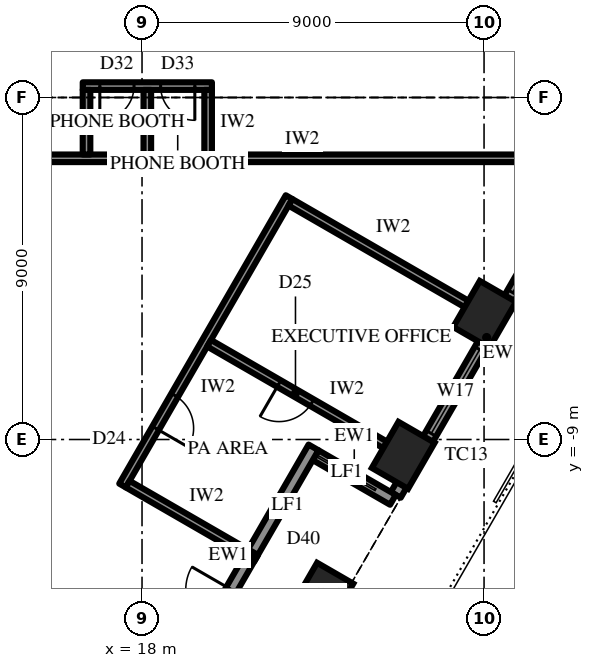
"""IFC4 building model, lengths in metres.
Left out: names, types, materials, properties, quantities, classifications, styles, units other than length and angle.
Written with IfcOpenShell. Run it as: python <this file> out.ifc"""

import sys

from ifc_helpers import new_model, si_unit, direction, frame, frame_2d, origin, origin_2d, place, context, subcontext, project, spatial, rectangle, extrude, element, fill, save


model = new_model("IFC4")
c1 = context("Model", 3, precision=1e-05, world=origin(), true_north=direction((0.0, 1.0)))
c2 = subcontext(c1, "Body", "Model", "MODEL_VIEW")
j1 = project(units=[si_unit("LENGTHUNIT", "METRE"), si_unit("PLANEANGLEUNIT", "RADIAN")], contexts=[c1])
p1 = place(None, origin())
s1 = spatial("IfcSite", under=j1, at=p1, CompositionType="ELEMENT")
p2 = place(p1, origin())
s2 = spatial("IfcBuilding", under=s1, at=p2, CompositionType="ELEMENT")
p3 = place(p2, frame((0.0, 0.0, 328.3)))
s3 = spatial("IfcBuildingStorey", under=s2, at=p3, CompositionType="ELEMENT", Elevation=328.3)
for number, where, z_axis, x_axis in (
    (1, (22.733, -13.125, 0.0), (0.0, 0.0, 1.0), (0.5, 0.866, 0.0)),
    (2, (24.874, -9.417, 0.0), (0.0, 0.0, 1.0), (0.5, 0.866, 0.0)),
    (3, (27.015, -5.708, 0.0), (0.0, 0.0, 1.0), (0.5, 0.866, 0.0)),
):
    element("IfcColumn", number, at=place(p3, frame(where, z_axis=z_axis, x_axis=x_axis)), inside=s3, PredefinedType="COLUMN", context=c2, shape_type="SweptSolid", body=[
        extrude(rectangle(XDim=1.4, YDim=1.1, at=origin_2d()), origin(), (0.0, 0.0, 1.0), 4.2),
    ])
p4 = place(p3, frame((24.677, -10.458, 0.0), z_axis=(0.0, 0.0, 1.0), x_axis=(0.499996453679, 0.866027451244, 0.0)))
e4 = element("IfcWall", 4, at=p4, inside=s3, PredefinedType="SOLIDWALL", context=c2, shape_type="SweptSolid", body=[
    extrude(rectangle(XDim=9.564, YDim=0.3, at=frame_2d((4.782, 0.0))), origin(), (0.0, 0.0, 1.0), 2.9),
])
p5 = place(p4, frame((1.866, 0.0, 0.6)))
e5 = element("IfcOpeningElement", 5, at=p5, cuts=e4, PredefinedType="OPENING", context=c2, shape_type="SweptSolid", body=[
    extrude(rectangle(XDim=2.55, YDim=2.05, at=frame_2d((1.275, 1.025))), frame((0.0, 0.16, 0.0), z_axis=(0.0, -1.0, 0.0), x_axis=(1.0, 0.0, 0.0)), (0.0, 0.0, 1.0), 0.32),
])
p6 = place(p4, frame((6.148, 0.0, 0.6)))
e6 = element("IfcOpeningElement", 6, at=p6, cuts=e4, PredefinedType="OPENING", context=c2, shape_type="SweptSolid", body=[
    extrude(rectangle(XDim=2.55, YDim=2.05, at=frame_2d((1.275, 1.025))), frame((0.0, 0.16, 0.0), z_axis=(0.0, -1.0, 0.0), x_axis=(1.0, 0.0, 0.0)), (0.0, 0.0, 1.0), 0.32),
])
p7 = place(p3, frame((24.602, -10.588, 0.0), z_axis=(0.0, 0.0, 1.0), x_axis=(-0.866016039709, 0.500016218704, 0.0)))
e7 = element("IfcWall", 7, at=p7, inside=s3, PredefinedType="SOLIDWALL", context=c2, shape_type="SweptSolid", body=[
    extrude(rectangle(XDim=2.35, YDim=0.3, at=frame_2d((1.175, 0.0))), origin(), (0.0, 0.0, 1.0), 2.9),
])
p8 = place(p3, frame((19.23, -14.892, 0.0), z_axis=(0.0, 0.0, 1.0), x_axis=(0.499999339774, 0.866025784966, 0.0)))
e8 = element("IfcWall", 8, at=p8, inside=s3, PredefinedType="SOLIDWALL", context=c2, shape_type="SweptSolid", body=[
    extrude(rectangle(XDim=6.564, YDim=0.3, at=frame_2d((3.282, 0.0))), origin(), (0.0, 0.0, 1.0), 2.9),
])
p9 = place(p8, frame((1.041, 0.0, 0.0)))
e9 = element("IfcOpeningElement", 9, at=p9, cuts=e8, PredefinedType="OPENING", context=c2, shape_type="SweptSolid", body=[
    extrude(rectangle(XDim=1.2, YDim=2.4, at=frame_2d((0.6, 1.2))), frame((0.0, 0.16, 0.0), z_axis=(0.0, -1.0, 0.0), x_axis=(1.0, 0.0, 0.0)), (0.0, 0.0, 1.0), 0.32),
])
p10 = place(p3, frame((17.487, -10.212, 0.0), z_axis=(0.0, 0.0, 1.0), x_axis=(0.500006995557, 0.86602136486, 0.0)))
e10 = element("IfcWall", 10, at=p10, inside=s3, PredefinedType="PARTITIONING", context=c2, shape_type="SweptSolid", body=[
    extrude(rectangle(XDim=8.764, YDim=0.2, at=frame_2d((4.382, 0.0))), origin(), (0.0, 0.0, 1.0), 4.0),
])
p11 = place(p10, frame((1.741, 0.0, 0.0)))
e11 = element("IfcOpeningElement", 11, at=p11, cuts=e10, PredefinedType="OPENING", context=c2, shape_type="SweptSolid", body=[
    extrude(rectangle(XDim=1.0, YDim=2.2, at=frame_2d((0.5, 1.1))), frame((0.0, 0.11, 0.0), z_axis=(0.0, -1.0, 0.0), x_axis=(1.0, 0.0, 0.0)), (0.0, 0.0, 1.0), 0.22),
])
p12 = place(p3, frame((17.624, -10.175, 0.0), z_axis=(0.0, 0.0, 1.0), x_axis=(0.86603551244, -0.499982490886, 0.0)))
e12 = element("IfcWall", 12, at=p12, inside=s3, PredefinedType="PARTITIONING", context=c2, shape_type="SweptSolid", body=[
    extrude(rectangle(XDim=3.901, YDim=0.2, at=frame_2d((1.951, 0.0))), origin(), (0.0, 0.0, 1.0), 3.082),
])
p13 = place(p3, frame((19.765, -6.467, 0.0), z_axis=(0.0, 0.0, 1.0), x_axis=(0.866024483152, -0.500001594578, 0.0)))
e13 = element("IfcWall", 13, at=p13, inside=s3, PredefinedType="PARTITIONING", context=c2, shape_type="SweptSolid", body=[
    extrude(rectangle(XDim=5.35, YDim=0.2, at=frame_2d((2.675, 0.0))), origin(), (0.0, 0.0, 1.0), 2.992),
])
p14 = place(p13, frame((2.125, 0.0, 0.0)))
e14 = element("IfcOpeningElement", 14, at=p14, cuts=e13, PredefinedType="OPENING", context=c2, shape_type="SweptSolid", body=[
    extrude(rectangle(XDim=1.0, YDim=2.2, at=frame_2d((0.5, 1.1))), frame((0.0, 0.11, 0.0), z_axis=(0.0, -1.0, 0.0), x_axis=(1.0, 0.0, 0.0)), (0.0, 0.0, 1.0), 0.22),
])
p15 = place(p3, frame((21.906, -2.758, 0.0), z_axis=(0.0, 0.0, 1.0), x_axis=(0.866024483152, -0.500001594578, 0.0)))
e15 = element("IfcWall", 15, at=p15, inside=s3, PredefinedType="PARTITIONING", context=c2, shape_type="SweptSolid", body=[
    extrude(rectangle(XDim=5.35, YDim=0.2, at=frame_2d((2.675, 0.0))), origin(), (0.0, 0.0, 1.0), 3.082),
])
p16 = place(p3, frame((12.425, -1.6, 0.0), z_axis=(0.0, 0.0, 1.0), x_axis=(1.0, 0.0, 0.0)))
e16 = element("IfcWall", 16, at=p16, inside=s3, PredefinedType="PARTITIONING", context=c2, shape_type="SweptSolid", body=[
    extrude(rectangle(XDim=16.327, YDim=0.2, at=frame_2d((8.164, 0.0))), origin(), (0.0, 0.0, 1.0), 4.0),
])
p17 = place(p16, frame((1.133, 0.0, 0.0)))
e17 = element("IfcOpeningElement", 17, at=p17, cuts=e16, PredefinedType="OPENING", context=c2, shape_type="SweptSolid", body=[
    extrude(rectangle(XDim=1.0, YDim=2.2, at=frame_2d((0.5, 1.1))), frame((0.0, 0.11, 0.0), z_axis=(0.0, -1.0, 0.0), x_axis=(1.0, 0.0, 0.0)), (0.0, 0.0, 1.0), 0.22),
])
p18 = place(p3, frame((16.439, 0.3, 0.0), z_axis=(0.0, 0.0, 1.0), x_axis=(1.0, 0.0, 0.0)))
e18 = element("IfcWall", 18, at=p18, inside=s3, PredefinedType="PARTITIONING", context=c2, shape_type="SweptSolid", body=[
    extrude(rectangle(XDim=3.4, YDim=0.2, at=frame_2d((1.7, 0.0))), origin(), (0.0, 0.0, 1.0), 4.0),
])
p19 = place(p18, frame((0.45, 0.0, 0.0)))
e19 = element("IfcOpeningElement", 19, at=p19, cuts=e18, PredefinedType="OPENING", context=c2, shape_type="SweptSolid", body=[
    extrude(rectangle(XDim=0.9, YDim=2.2, at=frame_2d((0.45, 1.1))), frame((0.0, 0.11, 0.0), z_axis=(0.0, -1.0, 0.0), x_axis=(1.0, 0.0, 0.0)), (0.0, 0.0, 1.0), 0.22),
])
p20 = place(p18, frame((2.05, 0.0, 0.0)))
e20 = element("IfcOpeningElement", 20, at=p20, cuts=e18, PredefinedType="OPENING", context=c2, shape_type="SweptSolid", body=[
    extrude(rectangle(XDim=0.9, YDim=2.2, at=frame_2d((0.45, 1.1))), frame((0.0, 0.11, 0.0), z_axis=(0.0, -1.0, 0.0), x_axis=(1.0, 0.0, 0.0)), (0.0, 0.0, 1.0), 0.22),
])
for number, where, z_axis, x_axis in (
    (21, (16.54, -1.5, 0.0), (0.0, 0.0, 1.0), (0.0, 1.0, 0.0)),
    (22, (18.139, -1.5, 0.0), (0.0, 0.0, 1.0), (0.0, 1.0, 0.0)),
    (23, (19.74, -1.5, 0.0), (0.0, 0.0, 1.0), (0.0, 1.0, 0.0)),
):
    element("IfcWall", number, at=place(p3, frame(where, z_axis=z_axis, x_axis=x_axis)), inside=s3, PredefinedType="PARTITIONING", context=c2, shape_type="SweptSolid", body=[
        extrude(rectangle(XDim=1.7, YDim=0.2, at=frame_2d((0.85, 0.0))), origin(), (0.0, 0.0, 1.0), 4.0),
    ])
p21 = place(p5, origin())
e24 = element("IfcWindow", 24, at=p21, inside=s3, PartitioningType="SINGLE_PANEL", PredefinedType="WINDOW", context=c2, shape_type="SweptSolid", body=[
    extrude(rectangle(XDim=2.55, YDim=2.05, at=frame_2d((1.275, 1.025))), frame((0.0, 0.03, 0.0), z_axis=(0.0, -1.0, 0.0), x_axis=(1.0, 0.0, 0.0)), (0.0, 0.0, 1.0), 0.06),
])
fill(e5, e24)
p22 = place(p6, origin())
e25 = element("IfcWindow", 25, at=p22, inside=s3, PartitioningType="SINGLE_PANEL", PredefinedType="WINDOW", context=c2, shape_type="SweptSolid", body=[
    extrude(rectangle(XDim=2.55, YDim=2.05, at=frame_2d((1.275, 1.025))), frame((0.0, 0.03, 0.0), z_axis=(0.0, -1.0, 0.0), x_axis=(1.0, 0.0, 0.0)), (0.0, 0.0, 1.0), 0.06),
])
fill(e6, e25)
p23 = place(p11, frame((1.0, 0.0, 0.0), z_axis=(0.0, 0.0, 1.0), x_axis=(-1.0, 0.0, 0.0)))
e26 = element("IfcDoor", 26, at=p23, inside=s3, OperationType="SINGLE_SWING_LEFT", PredefinedType="DOOR", context=c2, shape_type="SweptSolid", body=[
    extrude(rectangle(XDim=1.0, YDim=2.2, at=frame_2d((0.5, 1.1))), frame((0.0, 0.025, 0.0), z_axis=(0.0, -1.0, 0.0), x_axis=(1.0, 0.0, 0.0)), (0.0, 0.0, 1.0), 0.05),
])
fill(e11, e26)
p24 = place(p14, frame((1.0, 0.0, 0.0), z_axis=(0.0, 0.0, 1.0), x_axis=(-1.0, 0.0, 0.0)))
e27 = element("IfcDoor", 27, at=p24, inside=s3, OperationType="SINGLE_SWING_LEFT", PredefinedType="DOOR", context=c2, shape_type="SweptSolid", body=[
    extrude(rectangle(XDim=1.0, YDim=2.2, at=frame_2d((0.5, 1.1))), frame((0.0, 0.025, 0.0), z_axis=(0.0, -1.0, 0.0), x_axis=(1.0, 0.0, 0.0)), (0.0, 0.0, 1.0), 0.05),
])
fill(e14, e27)
p25 = place(p19, frame((0.9, 0.0, 0.0), z_axis=(0.0, 0.0, 1.0), x_axis=(-1.0, 0.0, 0.0)))
e28 = element("IfcDoor", 28, at=p25, inside=s3, OperationType="SINGLE_SWING_LEFT", PredefinedType="DOOR", context=c2, shape_type="SweptSolid", body=[
    extrude(rectangle(XDim=0.9, YDim=2.2, at=frame_2d((0.45, 1.1))), frame((0.0, 0.025, 0.0), z_axis=(0.0, -1.0, 0.0), x_axis=(1.0, 0.0, 0.0)), (0.0, 0.0, 1.0), 0.05),
])
fill(e19, e28)
p26 = place(p20, frame((0.9, 0.0, 0.0), z_axis=(0.0, 0.0, 1.0), x_axis=(-1.0, 0.0, 0.0)))
e29 = element("IfcDoor", 29, at=p26, inside=s3, OperationType="SINGLE_SWING_RIGHT", PredefinedType="DOOR", context=c2, shape_type="SweptSolid", body=[
    extrude(rectangle(XDim=0.9, YDim=2.2, at=frame_2d((0.45, 1.1))), frame((0.0, 0.025, 0.0), z_axis=(0.0, -1.0, 0.0), x_axis=(1.0, 0.0, 0.0)), (0.0, 0.0, 1.0), 0.05),
])
fill(e20, e29)
save(model, sys.argv[1])
